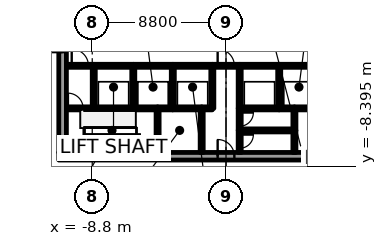
"""IFC4 building model, lengths in metres.
Left out: names, types, materials, properties, quantities, classifications, styles, units other than length and angle.
Written with IfcOpenShell. Run it as: python <this file> out.ifc"""

import sys

from ifc_helpers import new_model, si_unit, direction, frame, frame_2d, origin, place, context, subcontext, project, spatial, rectangle, extrude, element, fill, save


model = new_model("IFC4")
c1 = context("Model", 3, precision=1e-05, world=origin(), true_north=direction((0.0, 1.0)))
c2 = subcontext(c1, "Body", "Model", "MODEL_VIEW")
j1 = project(units=[si_unit("LENGTHUNIT", "METRE"), si_unit("PLANEANGLEUNIT", "RADIAN")], contexts=[c1])
p1 = place(None, origin())
s1 = spatial("IfcSite", under=j1, at=p1, CompositionType="ELEMENT")
p2 = place(p1, origin())
s2 = spatial("IfcBuilding", under=s1, at=p2, CompositionType="ELEMENT")
p3 = place(p2, origin())
s3 = spatial("IfcBuildingStorey", under=s2, at=p3, CompositionType="ELEMENT", Elevation=0.0)
p4 = place(p3, frame((-11.0, -7.75, 0.0), z_axis=(0.0, 0.0, 1.0), x_axis=(1.0, 0.0, 0.0)))
e1 = element("IfcWall", 1, at=p4, inside=s3, PredefinedType="SHEAR", context=c2, shape_type="SweptSolid", body=[
    extrude(rectangle(XDim=22.0, YDim=0.5, at=frame_2d((11.0, 0.0))), origin(), (0.0, 0.0, 1.0), 9.0),
])
p5 = place(p4, frame((10.45, 0.0, 0.0)))
e2 = element("IfcOpeningElement", 2, at=p5, cuts=e1, PredefinedType="OPENING", context=c2, shape_type="SweptSolid", body=[
    extrude(rectangle(XDim=1.1, YDim=2.1, at=frame_2d((0.55, 1.05))), frame((0.0, 0.25, 0.0), z_axis=(0.0, -1.0, 0.0), x_axis=(1.0, 0.0, 0.0)), (0.0, 0.0, 1.0), 0.5),
])
p6 = place(p3, frame((-10.75, -7.5, 0.0), z_axis=(0.0, 0.0, 1.0), x_axis=(0.0, 1.0, 0.0)))
e3 = element("IfcWall", 3, at=p6, inside=s3, PredefinedType="SHEAR", context=c2, shape_type="SweptSolid", body=[
    extrude(rectangle(XDim=15.0, YDim=0.5, at=frame_2d((7.5, 0.0))), origin(), (0.0, 0.0, 1.0), 9.0),
])
p7 = place(p6, frame((6.6, 0.0, 0.0)))
e4 = element("IfcOpeningElement", 4, at=p7, cuts=e3, PredefinedType="OPENING", context=c2, shape_type="SweptSolid", body=[
    extrude(rectangle(XDim=1.8, YDim=2.1, at=frame_2d((0.9, 1.05))), frame((0.0, 0.25, 0.0), z_axis=(0.0, -1.0, 0.0), x_axis=(1.0, 0.0, 0.0)), (0.0, 0.0, 1.0), 0.5),
])
p8 = place(p3, frame((-10.5, -4.6, 0.0), z_axis=(0.0, 0.0, 1.0), x_axis=(1.0, 0.0, 0.0)))
e5 = element("IfcWall", 5, at=p8, inside=s3, PredefinedType="SOLIDWALL", context=c2, shape_type="SweptSolid", body=[
    extrude(rectangle(XDim=1.8, YDim=0.2, at=frame_2d((0.9, 0.0))), origin(), (0.0, 0.0, 1.0), 8.75),
])
p9 = place(p8, frame((0.1, 0.0, 0.0)))
e6 = element("IfcOpeningElement", 6, at=p9, cuts=e5, PredefinedType="OPENING", context=c2, shape_type="SweptSolid", body=[
    extrude(rectangle(XDim=1.0, YDim=2.1, at=frame_2d((0.5, 1.05))), frame((0.0, 0.1, 0.0), z_axis=(0.0, -1.0, 0.0), x_axis=(1.0, 0.0, 0.0)), (0.0, 0.0, 1.0), 0.2),
])
p10 = place(p3, frame((-10.5, -1.8, 0.0), z_axis=(0.0, 0.0, 1.0), x_axis=(1.0, 0.0, 0.0)))
e7 = element("IfcWall", 7, at=p10, inside=s3, PredefinedType="SOLIDWALL", context=c2, shape_type="SweptSolid", body=[
    extrude(rectangle(XDim=1.8, YDim=0.2, at=frame_2d((0.9, 0.0))), origin(), (0.0, 0.0, 1.0), 8.75),
])
p11 = place(p10, frame((0.35, 0.0, 0.0)))
e8 = element("IfcOpeningElement", 8, at=p11, cuts=e7, PredefinedType="OPENING", context=c2, shape_type="SweptSolid", body=[
    extrude(rectangle(XDim=1.1, YDim=2.4, at=frame_2d((0.55, 1.2))), frame((0.0, 0.1, 0.0), z_axis=(0.0, -1.0, 0.0), x_axis=(1.0, 0.0, 0.0)), (0.0, 0.0, 1.0), 0.2),
])
p12 = place(p3, frame((-8.7, -4.6, 0.0), z_axis=(0.0, 0.0, 1.0), x_axis=(1.0, 0.0, 0.0)))
e9 = element("IfcWall", 9, at=p12, inside=s3, PredefinedType="SOLIDWALL", context=c2, shape_type="SweptSolid", body=[
    extrude(rectangle(XDim=2.6, YDim=0.2, at=frame_2d((1.3, 0.0))), origin(), (0.0, 0.0, 1.0), 8.75),
])
p13 = place(p3, frame((-8.7, -4.6, 0.0), z_axis=(0.0, 0.0, 1.0), x_axis=(0.0, 1.0, 0.0)))
e10 = element("IfcWall", 10, at=p13, inside=s3, PredefinedType="SOLIDWALL", context=c2, shape_type="SweptSolid", body=[
    extrude(rectangle(XDim=2.8, YDim=0.2, at=frame_2d((1.4, 0.0))), origin(), (0.0, 0.0, 1.0), 8.75),
])
p14 = place(p3, frame((-8.7, -1.8, 0.0), z_axis=(0.0, 0.0, 1.0), x_axis=(1.0, 0.0, 0.0)))
e11 = element("IfcWall", 11, at=p14, inside=s3, PredefinedType="SOLIDWALL", context=c2, shape_type="SweptSolid", body=[
    extrude(rectangle(XDim=2.6, YDim=0.2, at=frame_2d((1.3, 0.0))), origin(), (0.0, 0.0, 1.0), 8.75),
])
p15 = place(p14, frame((0.75, 0.0, 0.0)))
e12 = element("IfcOpeningElement", 12, at=p15, cuts=e11, PredefinedType="OPENING", context=c2, shape_type="SweptSolid", body=[
    extrude(rectangle(XDim=1.1, YDim=2.1, at=frame_2d((0.55, 1.05))), frame((0.0, 0.1, 0.0), z_axis=(0.0, -1.0, 0.0), x_axis=(1.0, 0.0, 0.0)), (0.0, 0.0, 1.0), 0.2),
])
p16 = place(p3, frame((-6.1, -4.6, 0.0), z_axis=(0.0, 0.0, 1.0), x_axis=(1.0, 0.0, 0.0)))
e13 = element("IfcWall", 13, at=p16, inside=s3, PredefinedType="SOLIDWALL", context=c2, shape_type="SweptSolid", body=[
    extrude(rectangle(XDim=1.6, YDim=0.2, at=frame_2d((0.8, 0.0))), origin(), (0.0, 0.0, 1.0), 8.75),
])
p17 = place(p3, frame((-6.1, -4.6, 0.0), z_axis=(0.0, 0.0, 1.0), x_axis=(0.0, 1.0, 0.0)))
e14 = element("IfcWall", 14, at=p17, inside=s3, PredefinedType="SOLIDWALL", context=c2, shape_type="SweptSolid", body=[
    extrude(rectangle(XDim=2.8, YDim=0.2, at=frame_2d((1.4, 0.0))), origin(), (0.0, 0.0, 1.0), 8.75),
])
p18 = place(p3, frame((-6.1, -1.8, 0.0), z_axis=(0.0, 0.0, 1.0), x_axis=(1.0, 0.0, 0.0)))
e15 = element("IfcWall", 15, at=p18, inside=s3, PredefinedType="SOLIDWALL", context=c2, shape_type="SweptSolid", body=[
    extrude(rectangle(XDim=2.6, YDim=0.2, at=frame_2d((1.3, 0.0))), origin(), (0.0, 0.0, 1.0), 8.75),
])
p19 = place(p18, frame((0.75, 0.0, 0.0)))
e16 = element("IfcOpeningElement", 16, at=p19, cuts=e15, PredefinedType="OPENING", context=c2, shape_type="SweptSolid", body=[
    extrude(rectangle(XDim=1.1, YDim=2.1, at=frame_2d((0.55, 1.05))), frame((0.0, 0.1, 0.0), z_axis=(0.0, -1.0, 0.0), x_axis=(1.0, 0.0, 0.0)), (0.0, 0.0, 1.0), 0.2),
])
p20 = place(p3, frame((-4.5, -4.6, 0.0), z_axis=(0.0, 0.0, 1.0), x_axis=(0.0, -1.0, 0.0)))
e17 = element("IfcWall", 17, at=p20, inside=s3, PredefinedType="SOLIDWALL", context=c2, shape_type="SweptSolid", body=[
    extrude(rectangle(XDim=2.9, YDim=0.2, at=frame_2d((1.45, 0.0))), origin(), (0.0, 0.0, 1.0), 8.75),
])
p21 = place(p3, frame((-4.5, -4.6, 0.0), z_axis=(0.0, 0.0, 1.0), x_axis=(1.0, 0.0, 0.0)))
e18 = element("IfcWall", 18, at=p21, inside=s3, PredefinedType="SOLIDWALL", context=c2, shape_type="SweptSolid", body=[
    extrude(rectangle(XDim=1.0, YDim=0.2, at=frame_2d((0.5, 0.0))), origin(), (0.0, 0.0, 1.0), 8.75),
])
p22 = place(p3, frame((-3.5, -4.6, 0.0), z_axis=(0.0, 0.0, 1.0), x_axis=(1.0, 0.0, 0.0)))
e19 = element("IfcWall", 19, at=p22, inside=s3, PredefinedType="SOLIDWALL", context=c2, shape_type="SweptSolid", body=[
    extrude(rectangle(XDim=1.9, YDim=0.2, at=frame_2d((0.95, 0.0))), origin(), (0.0, 0.0, 1.0), 8.75),
])
p23 = place(p3, frame((-3.5, -4.6, 0.0), z_axis=(0.0, 0.0, 1.0), x_axis=(0.0, 1.0, 0.0)))
e20 = element("IfcWall", 20, at=p23, inside=s3, PredefinedType="SOLIDWALL", context=c2, shape_type="SweptSolid", body=[
    extrude(rectangle(XDim=2.8, YDim=0.2, at=frame_2d((1.4, 0.0))), origin(), (0.0, 0.0, 1.0), 8.75),
])
p24 = place(p3, frame((-3.5, -1.8, 0.0), z_axis=(0.0, 0.0, 1.0), x_axis=(1.0, 0.0, 0.0)))
e21 = element("IfcWall", 21, at=p24, inside=s3, PredefinedType="SOLIDWALL", context=c2, shape_type="SweptSolid", body=[
    extrude(rectangle(XDim=2.6, YDim=0.2, at=frame_2d((1.3, 0.0))), origin(), (0.0, 0.0, 1.0), 8.75),
])
p25 = place(p24, frame((0.75, 0.0, 0.0)))
e22 = element("IfcOpeningElement", 22, at=p25, cuts=e21, PredefinedType="OPENING", context=c2, shape_type="SweptSolid", body=[
    extrude(rectangle(XDim=1.1, YDim=2.1, at=frame_2d((0.55, 1.05))), frame((0.0, 0.1, 0.0), z_axis=(0.0, -1.0, 0.0), x_axis=(1.0, 0.0, 0.0)), (0.0, 0.0, 1.0), 0.2),
])
p26 = place(p3, frame((-1.6, -7.5, 0.0), z_axis=(0.0, 0.0, 1.0), x_axis=(0.0, 1.0, 0.0)))
e23 = element("IfcWall", 23, at=p26, inside=s3, PredefinedType="SOLIDWALL", context=c2, shape_type="SweptSolid", body=[
    extrude(rectangle(XDim=2.9, YDim=0.2, at=frame_2d((1.45, 0.0))), origin(), (0.0, 0.0, 1.0), 8.75),
])
p27 = place(p26, frame((0.9, 0.0, 0.0)))
e24 = element("IfcOpeningElement", 24, at=p27, cuts=e23, PredefinedType="OPENING", context=c2, shape_type="SweptSolid", body=[
    extrude(rectangle(XDim=1.1, YDim=2.1, at=frame_2d((0.55, 1.05))), frame((0.0, 0.1, 0.0), z_axis=(0.0, -1.0, 0.0), x_axis=(1.0, 0.0, 0.0)), (0.0, 0.0, 1.0), 0.2),
])
p28 = place(p3, frame((-1.6, -4.6, 0.0), z_axis=(0.0, 0.0, 1.0), x_axis=(1.0, 0.0, 0.0)))
e25 = element("IfcWall", 25, at=p28, inside=s3, PredefinedType="SOLIDWALL", context=c2, shape_type="SweptSolid", body=[
    extrude(rectangle(XDim=0.7, YDim=0.2, at=frame_2d((0.35, 0.0))), origin(), (0.0, 0.0, 1.0), 8.75),
])
p29 = place(p3, frame((-0.9, -4.6, 0.0), z_axis=(0.0, 0.0, 1.0), x_axis=(0.0, 1.0, 0.0)))
e26 = element("IfcWall", 26, at=p29, inside=s3, PredefinedType="SOLIDWALL", context=c2, shape_type="SweptSolid", body=[
    extrude(rectangle(XDim=2.8, YDim=0.2, at=frame_2d((1.4, 0.0))), origin(), (0.0, 0.0, 1.0), 8.75),
])
p30 = place(p3, frame((-0.9, -1.8, 0.0), z_axis=(0.0, 0.0, 1.0), x_axis=(1.0, 0.0, 0.0)))
e27 = element("IfcWall", 27, at=p30, inside=s3, PredefinedType="SOLIDWALL", context=c2, shape_type="SweptSolid", body=[
    extrude(rectangle(XDim=1.8, YDim=0.2, at=frame_2d((0.9, 0.0))), origin(), (0.0, 0.0, 1.0), 8.75),
])
p31 = place(p30, frame((0.35, 0.0, 0.0)))
e28 = element("IfcOpeningElement", 28, at=p31, cuts=e27, PredefinedType="OPENING", context=c2, shape_type="SweptSolid", body=[
    extrude(rectangle(XDim=1.1, YDim=2.4, at=frame_2d((0.55, 1.2))), frame((0.0, 0.1, 0.0), z_axis=(0.0, -1.0, 0.0), x_axis=(1.0, 0.0, 0.0)), (0.0, 0.0, 1.0), 0.2),
])
p32 = place(p3, frame((0.9, -6.05, 0.0), z_axis=(0.0, 0.0, 1.0), x_axis=(0.0, -1.0, 0.0)))
e29 = element("IfcWall", 29, at=p32, inside=s3, PredefinedType="SOLIDWALL", context=c2, shape_type="SweptSolid", body=[
    extrude(rectangle(XDim=1.45, YDim=0.2, at=frame_2d((0.725, 0.0))), origin(), (0.0, 0.0, 1.0), 8.75),
])
p33 = place(p32, frame((0.275, 0.0, 0.0)))
e30 = element("IfcOpeningElement", 30, at=p33, cuts=e29, PredefinedType="OPENING", context=c2, shape_type="SweptSolid", body=[
    extrude(rectangle(XDim=0.9, YDim=2.4, at=frame_2d((0.45, 1.2))), frame((0.0, 0.1, 0.0), z_axis=(0.0, -1.0, 0.0), x_axis=(1.0, 0.0, 0.0)), (0.0, 0.0, 1.0), 0.2),
])
p34 = place(p3, frame((4.5, -6.05, 0.0), z_axis=(0.0, 0.0, 1.0), x_axis=(-1.0, 0.0, 0.0)))
e31 = element("IfcWall", 31, at=p34, inside=s3, PredefinedType="SOLIDWALL", context=c2, shape_type="SweptSolid", body=[
    extrude(rectangle(XDim=3.6, YDim=0.2, at=frame_2d((1.8, 0.0))), origin(), (0.0, 0.0, 1.0), 8.75),
])
p35 = place(p3, frame((0.9, -4.6, 0.0), z_axis=(0.0, 0.0, 1.0), x_axis=(0.0, -1.0, 0.0)))
e32 = element("IfcWall", 32, at=p35, inside=s3, PredefinedType="SOLIDWALL", context=c2, shape_type="SweptSolid", body=[
    extrude(rectangle(XDim=1.45, YDim=0.2, at=frame_2d((0.725, 0.0))), origin(), (0.0, 0.0, 1.0), 8.75),
])
p36 = place(p35, frame((0.275, 0.0, 0.0)))
e33 = element("IfcOpeningElement", 33, at=p36, cuts=e32, PredefinedType="OPENING", context=c2, shape_type="SweptSolid", body=[
    extrude(rectangle(XDim=0.9, YDim=2.4, at=frame_2d((0.45, 1.2))), frame((0.0, 0.1, 0.0), z_axis=(0.0, -1.0, 0.0), x_axis=(1.0, 0.0, 0.0)), (0.0, 0.0, 1.0), 0.2),
])
p37 = place(p3, frame((3.5, -4.6, 0.0), z_axis=(0.0, 0.0, 1.0), x_axis=(-1.0, 0.0, 0.0)))
e34 = element("IfcWall", 34, at=p37, inside=s3, PredefinedType="SOLIDWALL", context=c2, shape_type="SweptSolid", body=[
    extrude(rectangle(XDim=2.6, YDim=0.2, at=frame_2d((1.3, 0.0))), origin(), (0.0, 0.0, 1.0), 8.75),
])
p38 = place(p3, frame((0.9, -1.8, 0.0), z_axis=(0.0, 0.0, 1.0), x_axis=(0.0, -1.0, 0.0)))
e35 = element("IfcWall", 35, at=p38, inside=s3, PredefinedType="SOLIDWALL", context=c2, shape_type="SweptSolid", body=[
    extrude(rectangle(XDim=2.8, YDim=0.2, at=frame_2d((1.4, 0.0))), origin(), (0.0, 0.0, 1.0), 8.75),
])
p39 = place(p3, frame((0.9, -1.8, 0.0), z_axis=(0.0, 0.0, 1.0), x_axis=(1.0, 0.0, 0.0)))
e36 = element("IfcWall", 36, at=p39, inside=s3, PredefinedType="SOLIDWALL", context=c2, shape_type="SweptSolid", body=[
    extrude(rectangle(XDim=2.6, YDim=0.2, at=frame_2d((1.3, 0.0))), origin(), (0.0, 0.0, 1.0), 8.75),
])
p40 = place(p39, frame((0.75, 0.0, 0.0)))
e37 = element("IfcOpeningElement", 37, at=p40, cuts=e36, PredefinedType="OPENING", context=c2, shape_type="SweptSolid", body=[
    extrude(rectangle(XDim=1.1, YDim=2.1, at=frame_2d((0.55, 1.05))), frame((0.0, 0.1, 0.0), z_axis=(0.0, -1.0, 0.0), x_axis=(1.0, 0.0, 0.0)), (0.0, 0.0, 1.0), 0.2),
])
p41 = place(p3, frame((4.5, -4.6, 0.0), z_axis=(0.0, 0.0, 1.0), x_axis=(-1.0, 0.0, 0.0)))
e38 = element("IfcWall", 38, at=p41, inside=s3, PredefinedType="SOLIDWALL", context=c2, shape_type="SweptSolid", body=[
    extrude(rectangle(XDim=1.0, YDim=0.2, at=frame_2d((0.5, 0.0))), origin(), (0.0, 0.0, 1.0), 8.75),
])
p42 = place(p3, frame((3.5, -4.6, 0.0), z_axis=(0.0, 0.0, 1.0), x_axis=(0.0, 1.0, 0.0)))
e39 = element("IfcWall", 39, at=p42, inside=s3, PredefinedType="SOLIDWALL", context=c2, shape_type="SweptSolid", body=[
    extrude(rectangle(XDim=2.8, YDim=0.2, at=frame_2d((1.4, 0.0))), origin(), (0.0, 0.0, 1.0), 8.75),
])
p43 = place(p3, frame((3.5, -1.8, 0.0), z_axis=(0.0, 0.0, 1.0), x_axis=(1.0, 0.0, 0.0)))
e40 = element("IfcWall", 40, at=p43, inside=s3, PredefinedType="SOLIDWALL", context=c2, shape_type="SweptSolid", body=[
    extrude(rectangle(XDim=2.6, YDim=0.2, at=frame_2d((1.3, 0.0))), origin(), (0.0, 0.0, 1.0), 8.75),
])
p44 = place(p43, frame((0.75, 0.0, 0.0)))
e41 = element("IfcOpeningElement", 41, at=p44, cuts=e40, PredefinedType="OPENING", context=c2, shape_type="SweptSolid", body=[
    extrude(rectangle(XDim=1.1, YDim=2.1, at=frame_2d((0.55, 1.05))), frame((0.0, 0.1, 0.0), z_axis=(0.0, -1.0, 0.0), x_axis=(1.0, 0.0, 0.0)), (0.0, 0.0, 1.0), 0.2),
])
for number, where, z_axis, x_axis in (
    (42, (4.5, -7.5, 0.0), (0.0, 0.0, 1.0), (0.0, 1.0, 0.0)),
    (43, (4.5, -6.05, 0.0), (0.0, 0.0, 1.0), (0.0, 1.0, 0.0)),
):
    element("IfcWall", number, at=place(p3, frame(where, z_axis=z_axis, x_axis=x_axis)), inside=s3, PredefinedType="SOLIDWALL", context=c2, shape_type="SweptSolid", body=[
        extrude(rectangle(XDim=1.45, YDim=0.2, at=frame_2d((0.725, 0.0))), origin(), (0.0, 0.0, 1.0), 8.75),
    ])
p45 = place(p3, frame((4.5, -4.6, 0.0), z_axis=(0.0, 0.0, 1.0), x_axis=(1.0, 0.0, 0.0)))
e44 = element("IfcWall", 44, at=p45, inside=s3, PredefinedType="SOLIDWALL", context=c2, shape_type="SweptSolid", body=[
    extrude(rectangle(XDim=1.6, YDim=0.2, at=frame_2d((0.8, 0.0))), origin(), (0.0, 0.0, 1.0), 8.75),
])
p46 = place(p15, origin())
e45 = element("IfcDoor", 45, at=p46, inside=s3, OperationType="SLIDING_TO_LEFT", PredefinedType="DOOR", context=c2, shape_type="SweptSolid", body=[
    extrude(rectangle(XDim=1.1, YDim=2.1, at=frame_2d((0.55, 1.05))), frame((0.0, 0.025, 0.0), z_axis=(0.0, -1.0, 0.0), x_axis=(1.0, 0.0, 0.0)), (0.0, 0.0, 1.0), 0.05),
])
fill(e12, e45)
p47 = place(p19, origin())
e46 = element("IfcDoor", 46, at=p47, inside=s3, OperationType="SLIDING_TO_RIGHT", PredefinedType="DOOR", context=c2, shape_type="SweptSolid", body=[
    extrude(rectangle(XDim=1.1, YDim=2.1, at=frame_2d((0.55, 1.05))), frame((0.0, 0.025, 0.0), z_axis=(0.0, -1.0, 0.0), x_axis=(1.0, 0.0, 0.0)), (0.0, 0.0, 1.0), 0.05),
])
fill(e16, e46)
p48 = place(p25, origin())
e47 = element("IfcDoor", 47, at=p48, inside=s3, OperationType="SLIDING_TO_RIGHT", PredefinedType="DOOR", context=c2, shape_type="SweptSolid", body=[
    extrude(rectangle(XDim=1.1, YDim=2.1, at=frame_2d((0.55, 1.05))), frame((0.0, 0.025, 0.0), z_axis=(0.0, -1.0, 0.0), x_axis=(1.0, 0.0, 0.0)), (0.0, 0.0, 1.0), 0.05),
])
fill(e22, e47)
p49 = place(p40, origin())
e48 = element("IfcDoor", 48, at=p49, inside=s3, OperationType="SLIDING_TO_RIGHT", PredefinedType="DOOR", context=c2, shape_type="SweptSolid", body=[
    extrude(rectangle(XDim=1.1, YDim=2.1, at=frame_2d((0.55, 1.05))), frame((0.0, 0.025, 0.0), z_axis=(0.0, -1.0, 0.0), x_axis=(1.0, 0.0, 0.0)), (0.0, 0.0, 1.0), 0.05),
])
fill(e37, e48)
p50 = place(p44, origin())
e49 = element("IfcDoor", 49, at=p50, inside=s3, OperationType="SLIDING_TO_LEFT", PredefinedType="DOOR", context=c2, shape_type="SweptSolid", body=[
    extrude(rectangle(XDim=1.1, YDim=2.1, at=frame_2d((0.55, 1.05))), frame((0.0, 0.025, 0.0), z_axis=(0.0, -1.0, 0.0), x_axis=(1.0, 0.0, 0.0)), (0.0, 0.0, 1.0), 0.05),
])
fill(e41, e49)
p51 = place(p27, origin())
e50 = element("IfcDoor", 50, at=p51, inside=s3, OperationType="SLIDING_TO_RIGHT", PredefinedType="DOOR", context=c2, shape_type="SweptSolid", body=[
    extrude(rectangle(XDim=1.1, YDim=2.1, at=frame_2d((0.55, 1.05))), frame((0.0, 0.025, 0.0), z_axis=(0.0, -1.0, 0.0), x_axis=(1.0, 0.0, 0.0)), (0.0, 0.0, 1.0), 0.05),
])
fill(e24, e50)
p52 = place(p11, origin())
e51 = element("IfcDoor", 51, at=p52, inside=s3, OperationType="SINGLE_SWING_LEFT", PredefinedType="DOOR", context=c2, shape_type="SweptSolid", body=[
    extrude(rectangle(XDim=1.1, YDim=2.4, at=frame_2d((0.55, 1.2))), frame((0.0, 0.025, 0.0), z_axis=(0.0, -1.0, 0.0), x_axis=(1.0, 0.0, 0.0)), (0.0, 0.0, 1.0), 0.05),
])
fill(e8, e51)
p53 = place(p31, origin())
e52 = element("IfcDoor", 52, at=p53, inside=s3, OperationType="SINGLE_SWING_LEFT", PredefinedType="DOOR", context=c2, shape_type="SweptSolid", body=[
    extrude(rectangle(XDim=1.1, YDim=2.4, at=frame_2d((0.55, 1.2))), frame((0.0, 0.025, 0.0), z_axis=(0.0, -1.0, 0.0), x_axis=(1.0, 0.0, 0.0)), (0.0, 0.0, 1.0), 0.05),
])
fill(e28, e52)
p54 = place(p9, origin())
e53 = element("IfcDoor", 53, at=p54, inside=s3, OperationType="SINGLE_SWING_LEFT", PredefinedType="DOOR", context=c2, shape_type="SweptSolid", body=[
    extrude(rectangle(XDim=1.0, YDim=2.1, at=frame_2d((0.5, 1.05))), frame((0.0, 0.025, 0.0), z_axis=(0.0, -1.0, 0.0), x_axis=(1.0, 0.0, 0.0)), (0.0, 0.0, 1.0), 0.05),
])
fill(e6, e53)
p55 = place(p33, origin())
e54 = element("IfcDoor", 54, at=p55, inside=s3, OperationType="SINGLE_SWING_LEFT", PredefinedType="DOOR", context=c2, shape_type="SweptSolid", body=[
    extrude(rectangle(XDim=0.9, YDim=2.4, at=frame_2d((0.45, 1.2))), frame((0.0, 0.025, 0.0), z_axis=(0.0, -1.0, 0.0), x_axis=(1.0, 0.0, 0.0)), (0.0, 0.0, 1.0), 0.05),
])
fill(e30, e54)
p56 = place(p36, origin())
e55 = element("IfcDoor", 55, at=p56, inside=s3, OperationType="SINGLE_SWING_LEFT", PredefinedType="DOOR", context=c2, shape_type="SweptSolid", body=[
    extrude(rectangle(XDim=0.9, YDim=2.4, at=frame_2d((0.45, 1.2))), frame((0.0, 0.025, 0.0), z_axis=(0.0, -1.0, 0.0), x_axis=(1.0, 0.0, 0.0)), (0.0, 0.0, 1.0), 0.05),
])
fill(e33, e55)
p57 = place(p7, origin())
e56 = element("IfcDoor", 56, at=p57, inside=s3, OperationType="DOUBLE_DOOR_SINGLE_SWING", PredefinedType="DOOR", context=c2, shape_type="SweptSolid", body=[
    extrude(rectangle(XDim=1.8, YDim=2.1, at=frame_2d((0.9, 1.05))), frame((0.0, 0.025, 0.0), z_axis=(0.0, -1.0, 0.0), x_axis=(1.0, 0.0, 0.0)), (0.0, 0.0, 1.0), 0.05),
])
fill(e4, e56)
p58 = place(p5, origin())
e57 = element("IfcDoor", 57, at=p58, inside=s3, OperationType="SINGLE_SWING_RIGHT", PredefinedType="DOOR", context=c2, shape_type="SweptSolid", body=[
    extrude(rectangle(XDim=1.1, YDim=2.1, at=frame_2d((0.55, 1.05))), frame((0.0, 0.025, 0.0), z_axis=(0.0, -1.0, 0.0), x_axis=(1.0, 0.0, 0.0)), (0.0, 0.0, 1.0), 0.05),
])
fill(e2, e57)
save(model, sys.argv[1])
